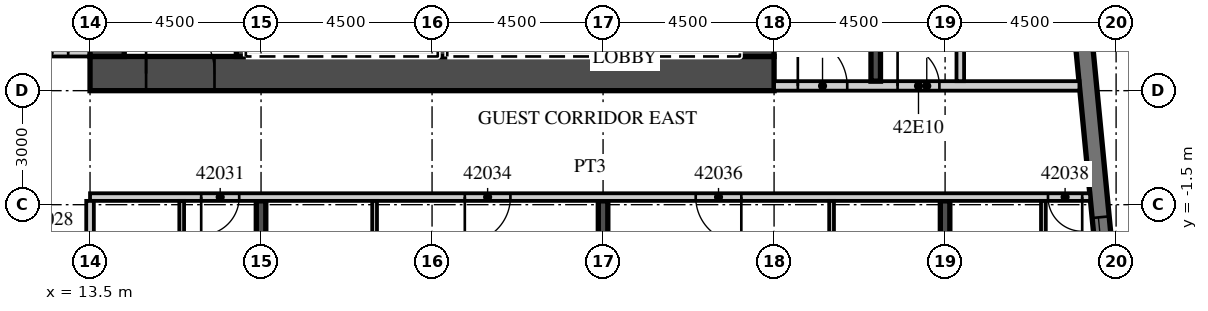
"""IFC4 building model, lengths in metres.
Left out: names, types, materials, properties, quantities, classifications, styles, units other than length and angle.
Written with IfcOpenShell. Run it as: python <this file> out.ifc"""

import sys

from ifc_helpers import new_model, si_unit, direction, frame, frame_2d, origin, place, context, subcontext, project, spatial, rectangle, extrude, element, fill, save


model = new_model("IFC4")
c1 = context("Model", 3, precision=1e-05, world=origin(), true_north=direction((0.0, 1.0)))
c2 = subcontext(c1, "Body", "Model", "MODEL_VIEW")
j1 = project(units=[si_unit("LENGTHUNIT", "METRE"), si_unit("PLANEANGLEUNIT", "RADIAN")], contexts=[c1])
p1 = place(None, origin())
s1 = spatial("IfcSite", under=j1, at=p1, CompositionType="ELEMENT")
p2 = place(p1, origin())
s2 = spatial("IfcBuilding", under=s1, at=p2, CompositionType="ELEMENT")
p3 = place(p2, frame((0.0, 0.0, 180.1)))
s3 = spatial("IfcBuildingStorey", under=s2, at=p3, CompositionType="ELEMENT", Elevation=180.1)
p4 = place(p3, frame((18.0, -19.245, 0.0), z_axis=(0.0, 0.0, 1.0), x_axis=(0.0, 1.0, 0.0)))
e1 = element("IfcWall", 1, at=p4, inside=s3, PredefinedType="SHEAR", context=c2, shape_type="SweptSolid", body=[
    extrude(rectangle(XDim=17.845, YDim=0.25, at=frame_2d((8.923, 0.0))), origin(), (0.0, 0.0, 1.0), 3.3),
])
p5 = place(p3, frame((27.0, -18.379, 0.0), z_axis=(0.0, 0.0, 1.0), x_axis=(0.0, 1.0, 0.0)))
e2 = element("IfcWall", 2, at=p5, inside=s3, PredefinedType="SHEAR", context=c2, shape_type="SweptSolid", body=[
    extrude(rectangle(XDim=16.979, YDim=0.25, at=frame_2d((8.489, 0.0))), origin(), (0.0, 0.0, 1.0), 3.3),
])
p6 = place(p3, frame((36.0, -17.512, 0.0), z_axis=(0.0, 0.0, 1.0), x_axis=(0.0, 1.0, 0.0)))
e3 = element("IfcWall", 3, at=p6, inside=s3, PredefinedType="SHEAR", context=c2, shape_type="SweptSolid", body=[
    extrude(rectangle(XDim=16.112, YDim=0.25, at=frame_2d((8.056, 0.0))), origin(), (0.0, 0.0, 1.0), 3.3),
])
p7 = place(p3, frame((41.214, -13.466, 0.0), z_axis=(0.0, 0.0, 1.0), x_axis=(-0.095847314626, 0.995396047952, 0.0)))
e4 = element("IfcWall", 4, at=p7, inside=s3, PredefinedType="SOLIDWALL", context=c2, shape_type="SweptSolid", body=[
    extrude(rectangle(XDim=34.0, YDim=0.45, at=frame_2d((17.0, 0.0))), origin(), (0.0, 0.0, 1.0), 3.02),
])
p8 = place(p7, frame((3.869, 0.0, 0.45)))
e5 = element("IfcOpeningElement", 5, at=p8, cuts=e4, PredefinedType="OPENING", context=c2, shape_type="SweptSolid", body=[
    extrude(rectangle(XDim=3.3, YDim=2.25, at=frame_2d((1.65, 1.125))), frame((0.0, 0.235, 0.0), z_axis=(0.0, -1.0, 0.0), x_axis=(1.0, 0.0, 0.0)), (0.0, 0.0, 1.0), 0.47),
])
p9 = place(p7, frame((8.39, 0.0, 0.45)))
e6 = element("IfcOpeningElement", 6, at=p9, cuts=e4, PredefinedType="OPENING", context=c2, shape_type="SweptSolid", body=[
    extrude(rectangle(XDim=3.3, YDim=2.25, at=frame_2d((1.65, 1.125))), frame((0.0, 0.235, 0.0), z_axis=(0.0, -1.0, 0.0), x_axis=(1.0, 0.0, 0.0)), (0.0, 0.0, 1.0), 0.47),
])
p10 = place(p3, frame((-13.5, 2.5, 0.0), z_axis=(0.0, 0.0, 1.0), x_axis=(1.0, 0.0, 0.0)))
e7 = element("IfcWall", 7, at=p10, inside=s3, PredefinedType="PARTITIONING", context=c2, shape_type="SweptSolid", body=[
    extrude(rectangle(XDim=27.0, YDim=0.2, at=frame_2d((13.5, 0.0))), origin(), (0.0, 0.0, 1.0), 3.02),
])
p11 = place(p10, frame((0.575, 0.0, 0.0)))
e8 = element("IfcOpeningElement", 8, at=p11, cuts=e7, PredefinedType="OPENING", context=c2, shape_type="SweptSolid", body=[
    extrude(rectangle(XDim=1.0, YDim=2.1, at=frame_2d((0.5, 1.05))), frame((0.0, 0.11, 0.0), z_axis=(0.0, -1.0, 0.0), x_axis=(1.0, 0.0, 0.0)), (0.0, 0.0, 1.0), 0.22),
])
p12 = place(p10, frame((9.863, 0.0, 0.0)))
e9 = element("IfcOpeningElement", 9, at=p12, cuts=e7, PredefinedType="OPENING", context=c2, shape_type="SweptSolid", body=[
    extrude(rectangle(XDim=1.2, YDim=2.1, at=frame_2d((0.6, 1.05))), frame((0.0, 0.11, 0.0), z_axis=(0.0, -1.0, 0.0), x_axis=(1.0, 0.0, 0.0)), (0.0, 0.0, 1.0), 0.22),
])
p13 = place(p10, frame((15.938, 0.0, 0.0)))
e10 = element("IfcOpeningElement", 10, at=p13, cuts=e7, PredefinedType="OPENING", context=c2, shape_type="SweptSolid", body=[
    extrude(rectangle(XDim=1.2, YDim=2.1, at=frame_2d((0.6, 1.05))), frame((0.0, 0.11, 0.0), z_axis=(0.0, -1.0, 0.0), x_axis=(1.0, 0.0, 0.0)), (0.0, 0.0, 1.0), 0.22),
])
p14 = place(p10, frame((25.425, 0.0, 0.0)))
e11 = element("IfcOpeningElement", 11, at=p14, cuts=e7, PredefinedType="OPENING", context=c2, shape_type="SweptSolid", body=[
    extrude(rectangle(XDim=1.0, YDim=2.1, at=frame_2d((0.5, 1.05))), frame((0.0, 0.11, 0.0), z_axis=(0.0, -1.0, 0.0), x_axis=(1.0, 0.0, 0.0)), (0.0, 0.0, 1.0), 0.22),
])
p15 = place(p3, frame((13.5, -1.3, 0.0), z_axis=(0.0, 0.0, 1.0), x_axis=(1.0, 0.0, 0.0)))
e12 = element("IfcWall", 12, at=p15, inside=s3, PredefinedType="PARTITIONING", context=c2, shape_type="SweptSolid", body=[
    extrude(rectangle(XDim=26.317, YDim=0.2, at=frame_2d((13.158, 0.0))), origin(), (0.0, 0.0, 1.0), 3.02),
])
p16 = place(p15, frame((2.925, 0.0, 0.0)))
e13 = element("IfcOpeningElement", 13, at=p16, cuts=e12, PredefinedType="OPENING", context=c2, shape_type="SweptSolid", body=[
    extrude(rectangle(XDim=1.0, YDim=2.1, at=frame_2d((0.5, 1.05))), frame((0.0, 0.11, 0.0), z_axis=(0.0, -1.0, 0.0), x_axis=(1.0, 0.0, 0.0)), (0.0, 0.0, 1.0), 0.22),
])
p17 = place(p15, frame((9.862, 0.0, 0.0)))
e14 = element("IfcOpeningElement", 14, at=p17, cuts=e12, PredefinedType="OPENING", context=c2, shape_type="SweptSolid", body=[
    extrude(rectangle(XDim=1.2, YDim=2.1, at=frame_2d((0.6, 1.05))), frame((0.0, 0.11, 0.0), z_axis=(0.0, -1.0, 0.0), x_axis=(1.0, 0.0, 0.0)), (0.0, 0.0, 1.0), 0.22),
])
p18 = place(p15, frame((15.938, 0.0, 0.0)))
e15 = element("IfcOpeningElement", 15, at=p18, cuts=e12, PredefinedType="OPENING", context=c2, shape_type="SweptSolid", body=[
    extrude(rectangle(XDim=1.2, YDim=2.1, at=frame_2d((0.6, 1.05))), frame((0.0, 0.11, 0.0), z_axis=(0.0, -1.0, 0.0), x_axis=(1.0, 0.0, 0.0)), (0.0, 0.0, 1.0), 0.22),
])
p19 = place(p15, frame((25.208, 0.0, 0.0)))
e16 = element("IfcOpeningElement", 16, at=p19, cuts=e12, PredefinedType="OPENING", context=c2, shape_type="SweptSolid", body=[
    extrude(rectangle(XDim=0.9, YDim=2.1, at=frame_2d((0.45, 1.05))), frame((0.0, 0.11, 0.0), z_axis=(0.0, -1.0, 0.0), x_axis=(1.0, 0.0, 0.0)), (0.0, 0.0, 1.0), 0.22),
])
p20 = place(p3, frame((13.5, -19.701, 0.0), z_axis=(0.0, 0.0, 1.0), x_axis=(0.0, 1.0, 0.0)))
e17 = element("IfcWall", 17, at=p20, inside=s3, PredefinedType="PARTITIONING", context=c2, shape_type="SweptSolid", body=[
    extrude(rectangle(XDim=18.301, YDim=0.2, at=frame_2d((9.15, 0.0))), origin(), (0.0, 0.0, 1.0), 3.02),
])
p21 = place(p3, frame((15.912, -6.625, 0.0), z_axis=(0.0, 0.0, 1.0), x_axis=(0.0, 1.0, 0.0)))
e18 = element("IfcWall", 18, at=p21, inside=s3, PredefinedType="PARTITIONING", context=c2, shape_type="SweptSolid", body=[
    extrude(rectangle(XDim=5.225, YDim=0.125, at=frame_2d((2.613, 0.0))), origin(), (0.0, 0.0, 1.0), 3.02),
])
p22 = place(p21, frame((1.875, 0.0, 0.0)))
e19 = element("IfcOpeningElement", 19, at=p22, cuts=e18, PredefinedType="OPENING", context=c2, shape_type="SweptSolid", body=[
    extrude(rectangle(XDim=0.9, YDim=2.1, at=frame_2d((0.45, 1.05))), frame((0.0, 0.073, 0.0), z_axis=(0.0, -1.0, 0.0), x_axis=(1.0, 0.0, 0.0)), (0.0, 0.0, 1.0), 0.145),
])
p23 = place(p3, frame((20.988, -6.625, 0.0), z_axis=(0.0, 0.0, 1.0), x_axis=(0.0, 1.0, 0.0)))
e20 = element("IfcWall", 20, at=p23, inside=s3, PredefinedType="PARTITIONING", context=c2, shape_type="SweptSolid", body=[
    extrude(rectangle(XDim=5.225, YDim=0.125, at=frame_2d((2.613, 0.0))), origin(), (0.0, 0.0, 1.0), 3.02),
])
p24 = place(p23, frame((1.875, 0.0, 0.0)))
e21 = element("IfcOpeningElement", 21, at=p24, cuts=e20, PredefinedType="OPENING", context=c2, shape_type="SweptSolid", body=[
    extrude(rectangle(XDim=0.9, YDim=2.1, at=frame_2d((0.45, 1.05))), frame((0.0, 0.073, 0.0), z_axis=(0.0, -1.0, 0.0), x_axis=(1.0, 0.0, 0.0)), (0.0, 0.0, 1.0), 0.145),
])
p25 = place(p3, frame((33.013, -6.625, 0.0), z_axis=(0.0, 0.0, 1.0), x_axis=(0.0, 1.0, 0.0)))
e22 = element("IfcWall", 22, at=p25, inside=s3, PredefinedType="PARTITIONING", context=c2, shape_type="SweptSolid", body=[
    extrude(rectangle(XDim=5.225, YDim=0.125, at=frame_2d((2.613, 0.0))), origin(), (0.0, 0.0, 1.0), 3.02),
])
p26 = place(p25, frame((1.875, 0.0, 0.0)))
e23 = element("IfcOpeningElement", 23, at=p26, cuts=e22, PredefinedType="OPENING", context=c2, shape_type="SweptSolid", body=[
    extrude(rectangle(XDim=0.9, YDim=2.1, at=frame_2d((0.45, 1.05))), frame((0.0, 0.073, 0.0), z_axis=(0.0, -1.0, 0.0), x_axis=(1.0, 0.0, 0.0)), (0.0, 0.0, 1.0), 0.145),
])
p27 = place(p3, frame((38.587, -6.445, 0.0), z_axis=(0.0, 0.0, 1.0), x_axis=(0.0, 1.0, 0.0)))
e24 = element("IfcWall", 24, at=p27, inside=s3, PredefinedType="PARTITIONING", context=c2, shape_type="SweptSolid", body=[
    extrude(rectangle(XDim=5.045, YDim=0.125, at=frame_2d((2.522, 0.0))), origin(), (0.0, 0.0, 1.0), 3.02),
])
p28 = place(p27, frame((1.695, 0.0, 0.0)))
e25 = element("IfcOpeningElement", 25, at=p28, cuts=e24, PredefinedType="OPENING", context=c2, shape_type="SweptSolid", body=[
    extrude(rectangle(XDim=0.9, YDim=2.1, at=frame_2d((0.45, 1.05))), frame((0.0, 0.073, 0.0), z_axis=(0.0, -1.0, 0.0), x_axis=(1.0, 0.0, 0.0)), (0.0, 0.0, 1.0), 0.145),
])
p29 = place(p3, frame((13.5, 1.95, 0.0), z_axis=(0.0, 0.0, 1.0), x_axis=(1.0, 0.0, 0.0)))
e26 = element("IfcWall", 26, at=p29, inside=s3, PredefinedType="SHEAR", context=c2, shape_type="SweptSolid", body=[
    extrude(rectangle(XDim=18.0, YDim=0.9, at=frame_2d((9.0, 0.0))), origin(), (0.0, 0.0, 1.0), 3.02),
])
p30 = place(p29, frame((1.475, 0.0, 0.0)))
e27 = element("IfcOpeningElement", 27, at=p30, cuts=e26, PredefinedType="OPENING", context=c2, shape_type="SweptSolid", body=[
    extrude(rectangle(XDim=1.8, YDim=2.1, at=frame_2d((0.9, 1.05))), frame((0.0, 0.46, 0.0), z_axis=(0.0, -1.0, 0.0), x_axis=(1.0, 0.0, 0.0)), (0.0, 0.0, 1.0), 0.92),
])
p31 = place(p3, frame((31.05, 2.4, 0.0), z_axis=(0.0, 0.0, 1.0), x_axis=(0.0, 1.0, 0.0)))
e28 = element("IfcWall", 28, at=p31, inside=s3, PredefinedType="SHEAR", context=c2, shape_type="SweptSolid", body=[
    extrude(rectangle(XDim=12.8, YDim=0.9, at=frame_2d((6.4, 0.0))), origin(), (0.0, 0.0, 1.0), 3.02),
])
p32 = place(p31, frame((0.2, 0.0, 0.0)))
e29 = element("IfcOpeningElement", 29, at=p32, cuts=e28, PredefinedType="OPENING", context=c2, shape_type="SweptSolid", body=[
    extrude(rectangle(XDim=1.1, YDim=2.1, at=frame_2d((0.55, 1.05))), frame((0.0, 0.46, 0.0), z_axis=(0.0, -1.0, 0.0), x_axis=(1.0, 0.0, 0.0)), (0.0, 0.0, 1.0), 0.92),
])
p33 = place(p3, frame((13.95, 2.4, 0.0), z_axis=(0.0, 0.0, 1.0), x_axis=(0.0, 1.0, 0.0)))
e30 = element("IfcWall", 30, at=p33, inside=s3, PredefinedType="SHEAR", context=c2, shape_type="SweptSolid", body=[
    extrude(rectangle(XDim=12.2, YDim=0.9, at=frame_2d((6.1, 0.0))), origin(), (0.0, 0.0, 1.0), 3.02),
])
p34 = place(p3, frame((17.475, 2.4, 0.0), z_axis=(0.0, 0.0, 1.0), x_axis=(0.0, 1.0, 0.0)))
e31 = element("IfcWall", 31, at=p34, inside=s3, PredefinedType="SHEAR", context=c2, shape_type="SweptSolid", body=[
    extrude(rectangle(XDim=3.15, YDim=0.25, at=frame_2d((1.575, 0.0))), origin(), (0.0, 0.0, 1.0), 3.02),
])
for number, where, z_axis, x_axis in (
    (32, (27.975, 2.4, 0.0), (0.0, 0.0, 1.0), (0.0, 1.0, 0.0)),
    (33, (22.775, 2.4, 0.0), (0.0, 0.0, 1.0), (0.0, 1.0, 0.0)),
):
    element("IfcWall", number, at=place(p3, frame(where, z_axis=z_axis, x_axis=x_axis)), inside=s3, PredefinedType="SHEAR", context=c2, shape_type="SweptSolid", body=[
        extrude(rectangle(XDim=2.9, YDim=0.25, at=frame_2d((1.45, 0.0))), origin(), (0.0, 0.0, 1.0), 3.02),
    ])
p35 = place(p3, frame((31.5, 1.625, 0.0), z_axis=(0.0, 0.0, 1.0), x_axis=(1.0, 0.0, 0.0)))
e34 = element("IfcWall", 34, at=p35, inside=s3, PredefinedType="PARTITIONING", context=c2, shape_type="SweptSolid", body=[
    extrude(rectangle(XDim=8.035, YDim=0.25, at=frame_2d((4.018, 0.0))), origin(), (0.0, 0.0, 1.0), 3.02),
])
p36 = place(p35, frame((0.625, 0.0, 0.0)))
e35 = element("IfcOpeningElement", 35, at=p36, cuts=e34, PredefinedType="OPENING", context=c2, shape_type="SweptSolid", body=[
    extrude(rectangle(XDim=1.3, YDim=2.1, at=frame_2d((0.65, 1.05))), frame((0.0, 0.135, 0.0), z_axis=(0.0, -1.0, 0.0), x_axis=(1.0, 0.0, 0.0)), (0.0, 0.0, 1.0), 0.27),
])
p37 = place(p35, frame((3.25, 0.0, 0.0)))
e36 = element("IfcOpeningElement", 36, at=p37, cuts=e34, PredefinedType="OPENING", context=c2, shape_type="SweptSolid", body=[
    extrude(rectangle(XDim=1.1, YDim=2.1, at=frame_2d((0.55, 1.05))), frame((0.0, 0.135, 0.0), z_axis=(0.0, -1.0, 0.0), x_axis=(1.0, 0.0, 0.0)), (0.0, 0.0, 1.0), 0.27),
])
p38 = place(p3, frame((34.175, 1.75, 0.0), z_axis=(0.0, 0.0, 1.0), x_axis=(0.0, 1.0, 0.0)))
e37 = element("IfcWall", 37, at=p38, inside=s3, PredefinedType="SHEAR", context=c2, shape_type="SweptSolid", body=[
    extrude(rectangle(XDim=8.35, YDim=0.25, at=frame_2d((4.175, 0.0))), origin(), (0.0, 0.0, 1.0), 3.02),
])
p39 = place(p3, frame((36.4, 1.75, 0.0), z_axis=(0.0, 0.0, 1.0), x_axis=(0.0, 1.0, 0.0)))
e38 = element("IfcWall", 38, at=p39, inside=s3, PredefinedType="PARTITIONING", context=c2, shape_type="SweptSolid", body=[
    extrude(rectangle(XDim=15.95, YDim=0.2, at=frame_2d((7.975, 0.0))), origin(), (0.0, 0.0, 1.0), 3.02),
])
p40 = place(p39, frame((14.7, 0.0, 0.0)))
e39 = element("IfcOpeningElement", 39, at=p40, cuts=e38, PredefinedType="OPENING", context=c2, shape_type="SweptSolid", body=[
    extrude(rectangle(XDim=0.9, YDim=2.1, at=frame_2d((0.45, 1.05))), frame((0.0, 0.11, 0.0), z_axis=(0.0, -1.0, 0.0), x_axis=(1.0, 0.0, 0.0)), (0.0, 0.0, 1.0), 0.22),
])
p41 = place(p9, origin())
e40 = element("IfcWindow", 40, at=p41, inside=s3, PartitioningType="SINGLE_PANEL", PredefinedType="WINDOW", context=c2, shape_type="SweptSolid", body=[
    extrude(rectangle(XDim=3.3, YDim=2.25, at=frame_2d((1.65, 1.125))), frame((0.0, 0.09, 0.0), z_axis=(0.0, -1.0, 0.0), x_axis=(1.0, 0.0, 0.0)), (0.0, 0.0, 1.0), 0.06),
])
fill(e6, e40)
p42 = place(p14, origin())
e41 = element("IfcDoor", 41, at=p42, inside=s3, OperationType="SINGLE_SWING_RIGHT", PredefinedType="DOOR", context=c2, shape_type="SweptSolid", body=[
    extrude(rectangle(XDim=1.0, YDim=2.1, at=frame_2d((0.5, 1.05))), frame((0.0, 0.025, 0.0), z_axis=(0.0, -1.0, 0.0), x_axis=(1.0, 0.0, 0.0)), (0.0, 0.0, 1.0), 0.05),
])
fill(e11, e41)
p43 = place(p16, origin())
e42 = element("IfcDoor", 42, at=p43, inside=s3, OperationType="SINGLE_SWING_LEFT", PredefinedType="DOOR", context=c2, shape_type="SweptSolid", body=[
    extrude(rectangle(XDim=1.0, YDim=2.1, at=frame_2d((0.5, 1.05))), frame((0.0, 0.025, 0.0), z_axis=(0.0, -1.0, 0.0), x_axis=(1.0, 0.0, 0.0)), (0.0, 0.0, 1.0), 0.05),
])
fill(e13, e42)
p44 = place(p17, origin())
e43 = element("IfcDoor", 43, at=p44, inside=s3, OperationType="SINGLE_SWING_LEFT", PredefinedType="DOOR", context=c2, shape_type="SweptSolid", body=[
    extrude(rectangle(XDim=1.2, YDim=2.1, at=frame_2d((0.6, 1.05))), frame((0.0, 0.025, 0.0), z_axis=(0.0, -1.0, 0.0), x_axis=(1.0, 0.0, 0.0)), (0.0, 0.0, 1.0), 0.05),
])
fill(e14, e43)
p45 = place(p18, origin())
e44 = element("IfcDoor", 44, at=p45, inside=s3, OperationType="SINGLE_SWING_RIGHT", PredefinedType="DOOR", context=c2, shape_type="SweptSolid", body=[
    extrude(rectangle(XDim=1.2, YDim=2.1, at=frame_2d((0.6, 1.05))), frame((0.0, 0.025, 0.0), z_axis=(0.0, -1.0, 0.0), x_axis=(1.0, 0.0, 0.0)), (0.0, 0.0, 1.0), 0.05),
])
fill(e15, e44)
p46 = place(p19, origin())
e45 = element("IfcDoor", 45, at=p46, inside=s3, OperationType="SINGLE_SWING_RIGHT", PredefinedType="DOOR", context=c2, shape_type="SweptSolid", body=[
    extrude(rectangle(XDim=0.9, YDim=2.1, at=frame_2d((0.45, 1.05))), frame((0.0, 0.025, 0.0), z_axis=(0.0, -1.0, 0.0), x_axis=(1.0, 0.0, 0.0)), (0.0, 0.0, 1.0), 0.05),
])
fill(e16, e45)
p47 = place(p30, origin())
e46 = element("IfcDoor", 46, at=p47, inside=s3, OperationType="DOUBLE_DOOR_DOUBLE_SWING", PredefinedType="DOOR", context=c2, shape_type="SweptSolid", body=[
    extrude(rectangle(XDim=1.8, YDim=2.1, at=frame_2d((0.9, 1.05))), frame((0.0, 0.025, 0.0), z_axis=(0.0, -1.0, 0.0), x_axis=(1.0, 0.0, 0.0)), (0.0, 0.0, 1.0), 0.05),
])
fill(e27, e46)
p48 = place(p36, origin())
e47 = element("IfcDoor", 47, at=p48, inside=s3, OperationType="SINGLE_SWING_LEFT", PredefinedType="DOOR", context=c2, shape_type="SweptSolid", body=[
    extrude(rectangle(XDim=1.3, YDim=2.1, at=frame_2d((0.65, 1.05))), frame((0.0, 0.025, 0.0), z_axis=(0.0, -1.0, 0.0), x_axis=(1.0, 0.0, 0.0)), (0.0, 0.0, 1.0), 0.05),
])
fill(e35, e47)
p49 = place(p37, origin())
e48 = element("IfcDoor", 48, at=p49, inside=s3, OperationType="SINGLE_SWING_LEFT", PredefinedType="DOOR", context=c2, shape_type="SweptSolid", body=[
    extrude(rectangle(XDim=1.1, YDim=2.1, at=frame_2d((0.55, 1.05))), frame((0.0, 0.025, 0.0), z_axis=(0.0, -1.0, 0.0), x_axis=(1.0, 0.0, 0.0)), (0.0, 0.0, 1.0), 0.05),
])
fill(e36, e48)
save(model, sys.argv[1])
